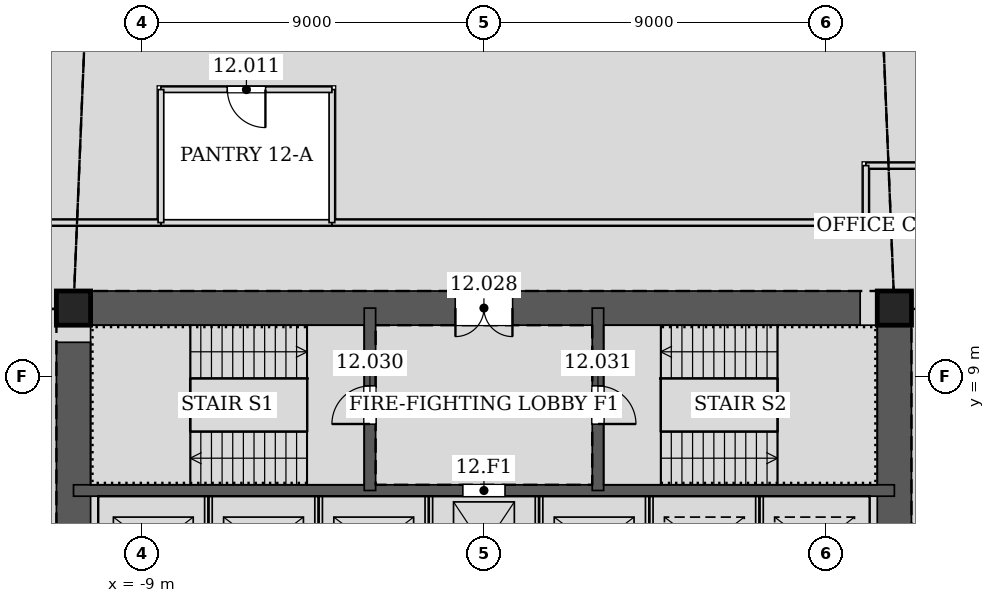
"""IFC4 building model, lengths in metres.
Left out: names, types, materials, properties, quantities, classifications, styles, units other than length and angle.
Written with IfcOpenShell. Run it as: python <this file> out.ifc"""

import sys

from ifc_helpers import new_model, si_unit, direction, frame, frame_2d, origin, origin_2d, place, context, subcontext, project, spatial, rectangle, hollow_rectangle, extrude, element, fill, save


model = new_model("IFC4")
c1 = context("Model", 3, precision=1e-05, world=origin(), true_north=direction((0.0, 1.0)))
c2 = subcontext(c1, "Body", "Model", "MODEL_VIEW")
j1 = project(units=[si_unit("LENGTHUNIT", "METRE"), si_unit("PLANEANGLEUNIT", "RADIAN")], contexts=[c1])
p1 = place(None, origin())
s1 = spatial("IfcSite", under=j1, at=p1, CompositionType="ELEMENT")
p2 = place(p1, origin())
s2 = spatial("IfcBuilding", under=s1, at=p2, CompositionType="ELEMENT")
p3 = place(p2, frame((0.0, 0.0, 58.2)))
s3 = spatial("IfcBuildingStorey", under=s2, at=p3, CompositionType="ELEMENT", Elevation=58.2)
for number, where, z_axis, x_axis in (
    (1, (10.8, 10.8, 0.0), (0.0, 0.0, 1.0), (1.0, 0.0, 0.0)),
    (2, (-10.8, 10.8, 0.0), (0.0, 0.0, 1.0), (1.0, 0.0, 0.0)),
):
    element("IfcColumn", number, at=place(p3, frame(where, z_axis=z_axis, x_axis=x_axis)), inside=s3, PredefinedType="COLUMN", context=c2, shape_type="SweptSolid", body=[
        extrude(hollow_rectangle(XDim=0.9, YDim=0.9, WallThickness=0.06, at=origin_2d()), origin(), (0.0, 0.0, 1.0), 4.2),
    ])
p4 = place(p3, frame((10.8, -10.8, 0.0), z_axis=(0.0, 0.0, 1.0), x_axis=(0.0, 1.0, 0.0)))
e3 = element("IfcWall", 3, at=p4, inside=s3, PredefinedType="SOLIDWALL", context=c2, shape_type="SweptSolid", body=[
    extrude(rectangle(XDim=21.6, YDim=0.9, at=frame_2d((10.8, 0.0))), origin(), (0.0, 0.0, 1.0), 4.2),
])
p5 = place(p4, frame((11.7, 0.0, 0.0)))
e4 = element("IfcOpeningElement", 4, at=p5, cuts=e3, PredefinedType="OPENING", context=c2, shape_type="SweptSolid", body=[
    extrude(rectangle(XDim=1.2, YDim=2.1, at=frame_2d((0.6, 1.05))), frame((0.0, 0.46, 0.0), z_axis=(0.0, -1.0, 0.0), x_axis=(1.0, 0.0, 0.0)), (0.0, 0.0, 1.0), 0.92),
])
p6 = place(p4, frame((8.7, 0.0, 0.0)))
e5 = element("IfcOpeningElement", 5, at=p6, cuts=e3, PredefinedType="OPENING", context=c2, shape_type="SweptSolid", body=[
    extrude(rectangle(XDim=1.2, YDim=2.1, at=frame_2d((0.6, 1.05))), frame((0.0, 0.46, 0.0), z_axis=(0.0, -1.0, 0.0), x_axis=(1.0, 0.0, 0.0)), (0.0, 0.0, 1.0), 0.92),
])
p7 = place(p3, frame((10.8, 10.8, 0.0), z_axis=(0.0, 0.0, 1.0), x_axis=(-1.0, 0.0, 0.0)))
e6 = element("IfcWall", 6, at=p7, inside=s3, PredefinedType="SOLIDWALL", context=c2, shape_type="SweptSolid", body=[
    extrude(rectangle(XDim=21.6, YDim=0.9, at=frame_2d((10.8, 0.0))), origin(), (0.0, 0.0, 1.0), 4.2),
])
p8 = place(p7, frame((10.05, 0.0, 0.0)))
e7 = element("IfcOpeningElement", 7, at=p8, cuts=e6, PredefinedType="OPENING", context=c2, shape_type="SweptSolid", body=[
    extrude(rectangle(XDim=1.5, YDim=2.1, at=frame_2d((0.75, 1.05))), frame((0.0, 0.46, 0.0), z_axis=(0.0, -1.0, 0.0), x_axis=(1.0, 0.0, 0.0)), (0.0, 0.0, 1.0), 0.92),
])
p9 = place(p3, frame((-10.8, 10.8, 0.0), z_axis=(0.0, 0.0, 1.0), x_axis=(0.0, -1.0, 0.0)))
e8 = element("IfcWall", 8, at=p9, inside=s3, PredefinedType="SOLIDWALL", context=c2, shape_type="SweptSolid", body=[
    extrude(rectangle(XDim=21.6, YDim=0.9, at=frame_2d((10.8, 0.0))), origin(), (0.0, 0.0, 1.0), 4.2),
])
p10 = place(p9, frame((8.7, 0.0, 0.0)))
e9 = element("IfcOpeningElement", 9, at=p10, cuts=e8, PredefinedType="OPENING", context=c2, shape_type="SweptSolid", body=[
    extrude(rectangle(XDim=1.2, YDim=2.1, at=frame_2d((0.6, 1.05))), frame((0.0, 0.46, 0.0), z_axis=(0.0, -1.0, 0.0), x_axis=(1.0, 0.0, 0.0)), (0.0, 0.0, 1.0), 0.92),
])
p11 = place(p9, frame((11.7, 0.0, 0.0)))
e10 = element("IfcOpeningElement", 10, at=p11, cuts=e8, PredefinedType="OPENING", context=c2, shape_type="SweptSolid", body=[
    extrude(rectangle(XDim=1.2, YDim=2.1, at=frame_2d((0.6, 1.05))), frame((0.0, 0.46, 0.0), z_axis=(0.0, -1.0, 0.0), x_axis=(1.0, 0.0, 0.0)), (0.0, 0.0, 1.0), 0.92),
])
p12 = place(p3, frame((-10.8, 6.0, 0.0), z_axis=(0.0, 0.0, 1.0), x_axis=(1.0, 0.0, 0.0)))
e11 = element("IfcWall", 11, at=p12, inside=s3, PredefinedType="SOLIDWALL", context=c2, shape_type="SweptSolid", body=[
    extrude(rectangle(XDim=21.6, YDim=0.3, at=frame_2d((10.8, 0.0))), origin(), (0.0, 0.0, 1.0), 4.2),
])
p13 = place(p12, frame((10.25, 0.0, 0.0)))
e12 = element("IfcOpeningElement", 12, at=p13, cuts=e11, PredefinedType="OPENING", context=c2, shape_type="SweptSolid", body=[
    extrude(rectangle(XDim=1.1, YDim=2.1, at=frame_2d((0.55, 1.05))), frame((0.0, 0.16, 0.0), z_axis=(0.0, -1.0, 0.0), x_axis=(1.0, 0.0, 0.0)), (0.0, 0.0, 1.0), 0.32),
])
p14 = place(p3, frame((-3.0, 6.0, 0.0), z_axis=(0.0, 0.0, 1.0), x_axis=(0.0, 1.0, 0.0)))
e13 = element("IfcWall", 13, at=p14, inside=s3, PredefinedType="SOLIDWALL", context=c2, shape_type="SweptSolid", body=[
    extrude(rectangle(XDim=4.8, YDim=0.3, at=frame_2d((2.4, 0.0))), origin(), (0.0, 0.0, 1.0), 4.2),
])
p15 = place(p14, frame((1.75, 0.0, 0.0)))
e14 = element("IfcOpeningElement", 14, at=p15, cuts=e13, PredefinedType="OPENING", context=c2, shape_type="SweptSolid", body=[
    extrude(rectangle(XDim=1.0, YDim=2.1, at=frame_2d((0.5, 1.05))), frame((0.0, 0.16, 0.0), z_axis=(0.0, -1.0, 0.0), x_axis=(1.0, 0.0, 0.0)), (0.0, 0.0, 1.0), 0.32),
])
p16 = place(p3, frame((3.0, 6.0, 0.0), z_axis=(0.0, 0.0, 1.0), x_axis=(0.0, 1.0, 0.0)))
e15 = element("IfcWall", 15, at=p16, inside=s3, PredefinedType="SOLIDWALL", context=c2, shape_type="SweptSolid", body=[
    extrude(rectangle(XDim=4.8, YDim=0.3, at=frame_2d((2.4, 0.0))), origin(), (0.0, 0.0, 1.0), 4.2),
])
p17 = place(p16, frame((1.75, 0.0, 0.0)))
e16 = element("IfcOpeningElement", 16, at=p17, cuts=e15, PredefinedType="OPENING", context=c2, shape_type="SweptSolid", body=[
    extrude(rectangle(XDim=1.0, YDim=2.1, at=frame_2d((0.5, 1.05))), frame((0.0, 0.16, 0.0), z_axis=(0.0, -1.0, 0.0), x_axis=(1.0, 0.0, 0.0)), (0.0, 0.0, 1.0), 0.32),
])
p18 = place(p3, frame((-3.999, 13.05, 0.0), z_axis=(0.0, 0.0, 1.0), x_axis=(-1.0, 0.0, 0.0)))
e17 = element("IfcWall", 17, at=p18, inside=s3, PredefinedType="PARTITIONING", context=c2, shape_type="SweptSolid", body=[
    extrude(rectangle(XDim=4.502, YDim=0.15, at=frame_2d((2.251, 0.0))), origin(), (0.0, 0.0, 1.0), 4.035),
])
p19 = place(p3, frame((-8.499, 13.05, 0.0), z_axis=(0.0, 0.0, 1.0), x_axis=(-1.0, 0.0, 0.0)))
e18 = element("IfcWall", 18, at=p19, inside=s3, PredefinedType="PARTITIONING", context=c2, shape_type="SweptSolid", body=[
    extrude(rectangle(XDim=4.551, YDim=0.15, at=frame_2d((2.275, 0.0))), origin(), (0.0, 0.0, 1.0), 3.014),
])
p20 = place(p3, frame((14.55, 14.55, 0.0), z_axis=(0.0, 0.0, 1.0), x_axis=(-1.0, 0.0, 0.0)))
e19 = element("IfcWall", 19, at=p20, inside=s3, PredefinedType="PARTITIONING", context=c2, shape_type="SweptSolid", body=[
    extrude(rectangle(XDim=4.5, YDim=0.15, at=frame_2d((2.25, 0.0))), origin(), (0.0, 0.0, 1.0), 3.014),
])
p21 = place(p3, frame((10.05, 14.55, 0.0), z_axis=(0.0, 0.0, 1.0), x_axis=(0.0, -1.0, 0.0)))
e20 = element("IfcWall", 20, at=p21, inside=s3, PredefinedType="PARTITIONING", context=c2, shape_type="SweptSolid", body=[
    extrude(rectangle(XDim=1.5, YDim=0.15, at=frame_2d((0.75, 0.0))), origin(), (0.0, 0.0, 1.0), 3.423),
])
p22 = place(p3, frame((10.05, 13.05, 0.0), z_axis=(0.0, 0.0, 1.0), x_axis=(-1.0, 0.0, 0.0)))
e21 = element("IfcWall", 21, at=p22, inside=s3, PredefinedType="PARTITIONING", context=c2, shape_type="SweptSolid", body=[
    extrude(rectangle(XDim=14.051, YDim=0.15, at=frame_2d((7.025, 0.0))), origin(), (0.0, 0.0, 1.0), 2.984),
])
p23 = place(p3, frame((-4.0, 13.05, 0.0), z_axis=(0.0, 0.0, 1.0), x_axis=(0.0, 1.0, 0.0)))
e22 = element("IfcWall", 22, at=p23, inside=s3, PredefinedType="PARTITIONING", context=c2, shape_type="SweptSolid", body=[
    extrude(rectangle(XDim=3.5, YDim=0.15, at=frame_2d((1.75, 0.0))), origin(), (0.0, 0.0, 1.0), 3.423),
])
p24 = place(p3, frame((-4.0, 16.55, 0.0), z_axis=(0.0, 0.0, 1.0), x_axis=(-1.0, 0.0, 0.0)))
e23 = element("IfcWall", 23, at=p24, inside=s3, PredefinedType="PARTITIONING", context=c2, shape_type="SweptSolid", body=[
    extrude(rectangle(XDim=4.5, YDim=0.15, at=frame_2d((2.25, 0.0))), origin(), (0.0, 0.0, 1.0), 3.565),
])
p25 = place(p24, frame((1.75, 0.0, 0.0)))
e24 = element("IfcOpeningElement", 24, at=p25, cuts=e23, PredefinedType="OPENING", context=c2, shape_type="SweptSolid", body=[
    extrude(rectangle(XDim=1.0, YDim=2.1, at=frame_2d((0.5, 1.05))), frame((0.0, 0.085, 0.0), z_axis=(0.0, -1.0, 0.0), x_axis=(1.0, 0.0, 0.0)), (0.0, 0.0, 1.0), 0.17),
])
p26 = place(p3, frame((-8.5, 16.55, 0.0), z_axis=(0.0, 0.0, 1.0), x_axis=(0.0, -1.0, 0.0)))
e25 = element("IfcWall", 25, at=p26, inside=s3, PredefinedType="PARTITIONING", context=c2, shape_type="SweptSolid", body=[
    extrude(rectangle(XDim=3.5, YDim=0.15, at=frame_2d((1.75, 0.0))), origin(), (0.0, 0.0, 1.0), 3.423),
])
for number, where, z_axis, x_axis in (
    (26, (-7.25, 3.15, 0.0), (0.0, 0.0, 1.0), (0.0, 1.0, 0.0)),
    (27, (-4.35, 3.15, 0.0), (0.0, 0.0, 1.0), (0.0, 1.0, 0.0)),
    (28, (-1.45, 3.15, 0.0), (0.0, 0.0, 1.0), (0.0, 1.0, 0.0)),
    (29, (1.45, 3.15, 0.0), (0.0, 0.0, 1.0), (0.0, 1.0, 0.0)),
    (30, (4.35, 3.15, 0.0), (0.0, 0.0, 1.0), (0.0, 1.0, 0.0)),
    (31, (7.25, 3.15, 0.0), (0.0, 0.0, 1.0), (0.0, 1.0, 0.0)),
):
    element("IfcWall", number, at=place(p3, frame(where, z_axis=z_axis, x_axis=x_axis)), inside=s3, PredefinedType="PARTITIONING", context=c2, shape_type="SweptSolid", body=[
        extrude(rectangle(XDim=2.7, YDim=0.2, at=frame_2d((1.35, 0.0))), origin(), (0.0, 0.0, 1.0), 4.2),
    ])
p27 = place(p25, origin())
e32 = element("IfcDoor", 32, at=p27, inside=s3, OperationType="SINGLE_SWING_LEFT", PredefinedType="DOOR", context=c2, shape_type="SweptSolid", body=[
    extrude(rectangle(XDim=1.0, YDim=2.1, at=frame_2d((0.5, 1.05))), frame((0.0, 0.025, 0.0), z_axis=(0.0, -1.0, 0.0), x_axis=(1.0, 0.0, 0.0)), (0.0, 0.0, 1.0), 0.05),
])
fill(e24, e32)
p28 = place(p8, origin())
e33 = element("IfcDoor", 33, at=p28, inside=s3, OperationType="DOUBLE_DOOR_SINGLE_SWING", PredefinedType="DOOR", context=c2, shape_type="SweptSolid", body=[
    extrude(rectangle(XDim=1.5, YDim=2.1, at=frame_2d((0.75, 1.05))), frame((0.0, 0.025, 0.0), z_axis=(0.0, -1.0, 0.0), x_axis=(1.0, 0.0, 0.0)), (0.0, 0.0, 1.0), 0.05),
])
fill(e7, e33)
p29 = place(p15, origin())
e34 = element("IfcDoor", 34, at=p29, inside=s3, OperationType="SINGLE_SWING_LEFT", PredefinedType="DOOR", context=c2, shape_type="SweptSolid", body=[
    extrude(rectangle(XDim=1.0, YDim=2.1, at=frame_2d((0.5, 1.05))), frame((0.0, 0.025, 0.0), z_axis=(0.0, -1.0, 0.0), x_axis=(1.0, 0.0, 0.0)), (0.0, 0.0, 1.0), 0.05),
])
fill(e14, e34)
p30 = place(p17, frame((1.0, 0.0, 0.0), z_axis=(0.0, 0.0, 1.0), x_axis=(-1.0, 0.0, 0.0)))
e35 = element("IfcDoor", 35, at=p30, inside=s3, OperationType="SINGLE_SWING_RIGHT", PredefinedType="DOOR", context=c2, shape_type="SweptSolid", body=[
    extrude(rectangle(XDim=1.0, YDim=2.1, at=frame_2d((0.5, 1.05))), frame((0.0, 0.025, 0.0), z_axis=(0.0, -1.0, 0.0), x_axis=(1.0, 0.0, 0.0)), (0.0, 0.0, 1.0), 0.05),
])
fill(e16, e35)
p31 = place(p13, origin())
e36 = element("IfcDoor", 36, at=p31, inside=s3, OperationType="DOUBLE_DOOR_SLIDING", PredefinedType="DOOR", context=c2, shape_type="SweptSolid", body=[
    extrude(rectangle(XDim=1.1, YDim=2.1, at=frame_2d((0.55, 1.05))), frame((0.0, 0.025, 0.0), z_axis=(0.0, -1.0, 0.0), x_axis=(1.0, 0.0, 0.0)), (0.0, 0.0, 1.0), 0.05),
])
fill(e12, e36)
save(model, sys.argv[1])
